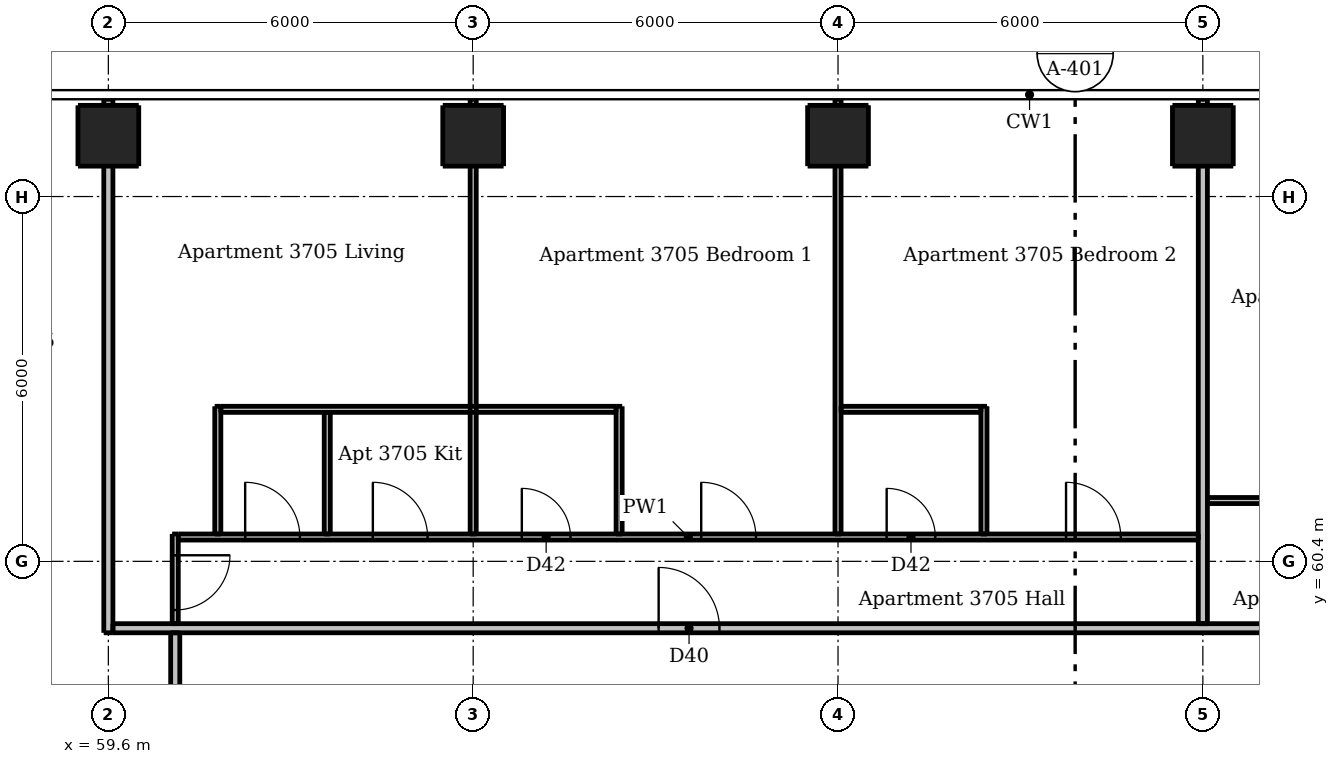
"""IFC4 building model, lengths in metres.
Left out: names, types, materials, properties, quantities, classifications, styles, units other than length and angle.
Written with IfcOpenShell. Run it as: python <this file> out.ifc"""

import sys

from ifc_helpers import new_model, si_unit, direction, frame, frame_2d, origin, origin_2d, place, context, subcontext, project, spatial, rectangle, extrude, element, fill, save


model = new_model("IFC4")
c1 = context("Model", 3, precision=1e-05, world=origin(), true_north=direction((0.0, 1.0)))
c2 = subcontext(c1, "Body", "Model", "MODEL_VIEW")
j1 = project(units=[si_unit("LENGTHUNIT", "METRE"), si_unit("PLANEANGLEUNIT", "RADIAN")], contexts=[c1])
p1 = place(None, origin())
s1 = spatial("IfcSite", under=j1, at=p1, CompositionType="ELEMENT")
p2 = place(p1, origin())
s2 = spatial("IfcBuilding", under=s1, at=p2, CompositionType="ELEMENT")
p3 = place(p2, frame((0.0, 0.0, 140.5)))
s3 = spatial("IfcBuildingStorey", under=s2, at=p3, CompositionType="ELEMENT", Elevation=140.5)
for number, where, z_axis, x_axis in (
    (1, (59.6, 67.4, 0.0), (0.0, 0.0, 1.0), (1.0, 0.0, 0.0)),
    (2, (65.6, 67.4, 0.0), (0.0, 0.0, 1.0), (1.0, 0.0, 0.0)),
    (3, (71.6, 67.4, 0.0), (0.0, 0.0, 1.0), (1.0, 0.0, 0.0)),
    (4, (77.6, 67.4, 0.0), (0.0, 0.0, 1.0), (1.0, 0.0, 0.0)),
):
    element("IfcColumn", number, at=place(p3, frame(where, z_axis=z_axis, x_axis=x_axis)), inside=s3, PredefinedType="COLUMN", context=c2, shape_type="SweptSolid", body=[
        extrude(rectangle(XDim=1.0, YDim=1.0, at=origin_2d()), origin(), (0.0, 0.0, 1.0), 3.05),
    ])
p4 = place(p3, frame((60.7, 60.85, 0.0), z_axis=(0.0, 0.0, 1.0), x_axis=(0.0, -1.0, 0.0)))
e5 = element("IfcWall", 5, at=p4, inside=s3, PredefinedType="PARTITIONING", context=c2, shape_type="SweptSolid", body=[
    extrude(rectangle(XDim=1.475, YDim=0.1, at=frame_2d((0.738, 0.0))), origin(), (0.0, 0.0, 1.0), 3.05),
])
p5 = place(p4, frame((0.35, 0.0, 0.0)))
e6 = element("IfcOpeningElement", 6, at=p5, cuts=e5, PredefinedType="OPENING", context=c2, shape_type="SweptSolid", body=[
    extrude(rectangle(XDim=0.9, YDim=2.1, at=frame_2d((0.45, 1.05))), frame((0.0, 0.06, 0.0), z_axis=(0.0, -1.0, 0.0), x_axis=(1.0, 0.0, 0.0)), (0.0, 0.0, 1.0), 0.12),
])
p6 = place(p3, frame((61.4, 60.85, 0.0), z_axis=(0.0, 0.0, 1.0), x_axis=(0.0, 1.0, 0.0)))
e7 = element("IfcWall", 7, at=p6, inside=s3, PredefinedType="PARTITIONING", context=c2, shape_type="SweptSolid", body=[
    extrude(rectangle(XDim=2.1, YDim=0.1, at=frame_2d((1.05, 0.0))), origin(), (0.0, 0.0, 1.0), 3.05),
])
p7 = place(p3, frame((63.2, 60.85, 0.0), z_axis=(0.0, 0.0, 1.0), x_axis=(0.0, 1.0, 0.0)))
e8 = element("IfcWall", 8, at=p7, inside=s3, PredefinedType="PARTITIONING", context=c2, shape_type="SweptSolid", body=[
    extrude(rectangle(XDim=2.0, YDim=0.1, at=frame_2d((1.0, 0.0))), origin(), (0.0, 0.0, 1.0), 3.05),
])
p8 = place(p3, frame((65.6, 60.85, 0.0), z_axis=(0.0, 0.0, 1.0), x_axis=(0.0, 1.0, 0.0)))
e9 = element("IfcWall", 9, at=p8, inside=s3, PredefinedType="PARTITIONING", context=c2, shape_type="SweptSolid", body=[
    extrude(rectangle(XDim=7.15, YDim=0.1, at=frame_2d((3.575, 0.0))), origin(), (0.0, 0.0, 1.0), 2.516),
])
p9 = place(p3, frame((68.0, 60.85, 0.0), z_axis=(0.0, 0.0, 1.0), x_axis=(0.0, 1.0, 0.0)))
e10 = element("IfcWall", 10, at=p9, inside=s3, PredefinedType="PARTITIONING", context=c2, shape_type="SweptSolid", body=[
    extrude(rectangle(XDim=2.1, YDim=0.1, at=frame_2d((1.05, 0.0))), origin(), (0.0, 0.0, 1.0), 3.05),
])
p10 = place(p3, frame((71.6, 60.85, 0.0), z_axis=(0.0, 0.0, 1.0), x_axis=(0.0, 1.0, 0.0)))
e11 = element("IfcWall", 11, at=p10, inside=s3, PredefinedType="PARTITIONING", context=c2, shape_type="SweptSolid", body=[
    extrude(rectangle(XDim=7.15, YDim=0.1, at=frame_2d((3.575, 0.0))), origin(), (0.0, 0.0, 1.0), 2.516),
])
p11 = place(p3, frame((74.0, 60.85, 0.0), z_axis=(0.0, 0.0, 1.0), x_axis=(0.0, 1.0, 0.0)))
e12 = element("IfcWall", 12, at=p11, inside=s3, PredefinedType="PARTITIONING", context=c2, shape_type="SweptSolid", body=[
    extrude(rectangle(XDim=2.1, YDim=0.1, at=frame_2d((1.05, 0.0))), origin(), (0.0, 0.0, 1.0), 3.05),
])
p12 = place(p3, frame((61.45, 62.9, 0.0), z_axis=(0.0, 0.0, 1.0), x_axis=(1.0, 0.0, 0.0)))
e13 = element("IfcWall", 13, at=p12, inside=s3, PredefinedType="PARTITIONING", context=c2, shape_type="SweptSolid", body=[
    extrude(rectangle(XDim=6.5, YDim=0.1, at=frame_2d((3.25, 0.0))), origin(), (0.0, 0.0, 1.0), 3.05),
])
p13 = place(p3, frame((71.65, 62.9, 0.0), z_axis=(0.0, 0.0, 1.0), x_axis=(1.0, 0.0, 0.0)))
e14 = element("IfcWall", 14, at=p13, inside=s3, PredefinedType="PARTITIONING", context=c2, shape_type="SweptSolid", body=[
    extrude(rectangle(XDim=2.3, YDim=0.1, at=frame_2d((1.15, 0.0))), origin(), (0.0, 0.0, 1.0), 3.05),
])
p14 = place(p3, frame((83.55, 61.4, 0.0), z_axis=(0.0, 0.0, 1.0), x_axis=(-1.0, 0.0, 0.0)))
e15 = element("IfcWall", 15, at=p14, inside=s3, PredefinedType="PARTITIONING", context=c2, shape_type="SweptSolid", body=[
    extrude(rectangle(XDim=5.875, YDim=0.1, at=frame_2d((2.938, 0.0))), origin(), (0.0, 0.0, 1.0), 3.05),
])
p15 = place(p14, frame((3.75, 0.0, 0.0)))
e16 = element("IfcOpeningElement", 16, at=p15, cuts=e15, PredefinedType="OPENING", context=c2, shape_type="SweptSolid", body=[
    extrude(rectangle(XDim=0.8, YDim=2.1, at=frame_2d((0.4, 1.05))), frame((0.0, 0.06, 0.0), z_axis=(0.0, -1.0, 0.0), x_axis=(1.0, 0.0, 0.0)), (0.0, 0.0, 1.0), 0.12),
])
p16 = place(p3, frame((60.75, 60.8, 0.0), z_axis=(0.0, 0.0, 1.0), x_axis=(1.0, 0.0, 0.0)))
e17 = element("IfcWall", 17, at=p16, inside=s3, PredefinedType="PARTITIONING", context=c2, shape_type="SweptSolid", body=[
    extrude(rectangle(XDim=16.775, YDim=0.1, at=frame_2d((8.387, 0.0))), origin(), (0.0, 0.0, 1.0), 3.05),
])
p17 = place(p16, frame((3.2, 0.0, 0.0)))
e18 = element("IfcOpeningElement", 18, at=p17, cuts=e17, PredefinedType="OPENING", context=c2, shape_type="SweptSolid", body=[
    extrude(rectangle(XDim=0.9, YDim=2.1, at=frame_2d((0.45, 1.05))), frame((0.0, 0.06, 0.0), z_axis=(0.0, -1.0, 0.0), x_axis=(1.0, 0.0, 0.0)), (0.0, 0.0, 1.0), 0.12),
])
p18 = place(p16, frame((1.1, 0.0, 0.0)))
e19 = element("IfcOpeningElement", 19, at=p18, cuts=e17, PredefinedType="OPENING", context=c2, shape_type="SweptSolid", body=[
    extrude(rectangle(XDim=0.9, YDim=2.1, at=frame_2d((0.45, 1.05))), frame((0.0, 0.06, 0.0), z_axis=(0.0, -1.0, 0.0), x_axis=(1.0, 0.0, 0.0)), (0.0, 0.0, 1.0), 0.12),
])
p19 = place(p16, frame((8.6, 0.0, 0.0)))
e20 = element("IfcOpeningElement", 20, at=p19, cuts=e17, PredefinedType="OPENING", context=c2, shape_type="SweptSolid", body=[
    extrude(rectangle(XDim=0.9, YDim=2.1, at=frame_2d((0.45, 1.05))), frame((0.0, 0.06, 0.0), z_axis=(0.0, -1.0, 0.0), x_axis=(1.0, 0.0, 0.0)), (0.0, 0.0, 1.0), 0.12),
])
p20 = place(p16, frame((14.6, 0.0, 0.0)))
e21 = element("IfcOpeningElement", 21, at=p20, cuts=e17, PredefinedType="OPENING", context=c2, shape_type="SweptSolid", body=[
    extrude(rectangle(XDim=0.9, YDim=2.1, at=frame_2d((0.45, 1.05))), frame((0.0, 0.06, 0.0), z_axis=(0.0, -1.0, 0.0), x_axis=(1.0, 0.0, 0.0)), (0.0, 0.0, 1.0), 0.12),
])
p21 = place(p16, frame((5.65, 0.0, 0.0)))
e22 = element("IfcOpeningElement", 22, at=p21, cuts=e17, PredefinedType="OPENING", context=c2, shape_type="SweptSolid", body=[
    extrude(rectangle(XDim=0.8, YDim=2.1, at=frame_2d((0.4, 1.05))), frame((0.0, 0.06, 0.0), z_axis=(0.0, -1.0, 0.0), x_axis=(1.0, 0.0, 0.0)), (0.0, 0.0, 1.0), 0.12),
])
p22 = place(p16, frame((11.65, 0.0, 0.0)))
e23 = element("IfcOpeningElement", 23, at=p22, cuts=e17, PredefinedType="OPENING", context=c2, shape_type="SweptSolid", body=[
    extrude(rectangle(XDim=0.8, YDim=2.1, at=frame_2d((0.4, 1.05))), frame((0.0, 0.06, 0.0), z_axis=(0.0, -1.0, 0.0), x_axis=(1.0, 0.0, 0.0)), (0.0, 0.0, 1.0), 0.12),
])
p23 = place(p3, frame((59.6, 59.225, 0.0), z_axis=(0.0, 0.0, 1.0), x_axis=(0.0, 1.0, 0.0)))
e24 = element("IfcWall", 24, at=p23, inside=s3, PredefinedType="PARTITIONING", context=c2, shape_type="SweptSolid", body=[
    extrude(rectangle(XDim=8.775, YDim=0.15, at=frame_2d((4.387, 0.0))), origin(), (0.0, 0.0, 1.0), 2.51),
])
p24 = place(p3, frame((60.7, 30.325, 0.0), z_axis=(0.0, 0.0, 1.0), x_axis=(0.0, 1.0, 0.0)))
e25 = element("IfcWall", 25, at=p24, inside=s3, PredefinedType="PARTITIONING", context=c2, shape_type="SweptSolid", body=[
    extrude(rectangle(XDim=28.9, YDim=0.15, at=frame_2d((14.45, 0.0))), origin(), (0.0, 0.0, 1.0), 3.05),
])
p25 = place(p24, frame((9.225, 0.0, 0.0)))
e26 = element("IfcOpeningElement", 26, at=p25, cuts=e25, PredefinedType="OPENING", context=c2, shape_type="SweptSolid", body=[
    extrude(rectangle(XDim=1.0, YDim=2.1, at=frame_2d((0.5, 1.05))), frame((0.0, 0.085, 0.0), z_axis=(0.0, -1.0, 0.0), x_axis=(1.0, 0.0, 0.0)), (0.0, 0.0, 1.0), 0.17),
])
p26 = place(p24, frame((26.025, 0.0, 0.0)))
e27 = element("IfcOpeningElement", 27, at=p26, cuts=e25, PredefinedType="OPENING", context=c2, shape_type="SweptSolid", body=[
    extrude(rectangle(XDim=1.0, YDim=2.1, at=frame_2d((0.5, 1.05))), frame((0.0, 0.085, 0.0), z_axis=(0.0, -1.0, 0.0), x_axis=(1.0, 0.0, 0.0)), (0.0, 0.0, 1.0), 0.17),
])
p27 = place(p3, frame((77.6, 59.375, 0.0), z_axis=(0.0, 0.0, 1.0), x_axis=(0.0, 1.0, 0.0)))
e28 = element("IfcWall", 28, at=p27, inside=s3, PredefinedType="PARTITIONING", context=c2, shape_type="SweptSolid", body=[
    extrude(rectangle(XDim=8.625, YDim=0.15, at=frame_2d((4.312, 0.0))), origin(), (0.0, 0.0, 1.0), 2.516),
])
p28 = place(p3, frame((59.675, 59.3, 0.0), z_axis=(0.0, 0.0, 1.0), x_axis=(1.0, 0.0, 0.0)))
e29 = element("IfcWall", 29, at=p28, inside=s3, PredefinedType="PARTITIONING", context=c2, shape_type="SweptSolid", body=[
    extrude(rectangle(XDim=28.55, YDim=0.15, at=frame_2d((14.275, 0.0))), origin(), (0.0, 0.0, 1.0), 3.05),
])
p29 = place(p28, frame((8.975, 0.0, 0.0)))
e30 = element("IfcOpeningElement", 30, at=p29, cuts=e29, PredefinedType="OPENING", context=c2, shape_type="SweptSolid", body=[
    extrude(rectangle(XDim=1.0, YDim=2.1, at=frame_2d((0.5, 1.05))), frame((0.0, 0.085, 0.0), z_axis=(0.0, -1.0, 0.0), x_axis=(1.0, 0.0, 0.0)), (0.0, 0.0, 1.0), 0.17),
])
p30 = place(p28, frame((25.775, 0.0, 0.0)))
e31 = element("IfcOpeningElement", 31, at=p30, cuts=e29, PredefinedType="OPENING", context=c2, shape_type="SweptSolid", body=[
    extrude(rectangle(XDim=1.0, YDim=2.1, at=frame_2d((0.5, 1.05))), frame((0.0, 0.085, 0.0), z_axis=(0.0, -1.0, 0.0), x_axis=(1.0, 0.0, 0.0)), (0.0, 0.0, 1.0), 0.17),
])
p31 = place(p29, origin())
e32 = element("IfcDoor", 32, at=p31, inside=s3, OperationType="SINGLE_SWING_LEFT", PredefinedType="DOOR", context=c2, shape_type="SweptSolid", body=[
    extrude(rectangle(XDim=1.0, YDim=2.1, at=frame_2d((0.5, 1.05))), frame((0.0, 0.025, 0.0), z_axis=(0.0, -1.0, 0.0), x_axis=(1.0, 0.0, 0.0)), (0.0, 0.0, 1.0), 0.05),
])
fill(e30, e32)
p32 = place(p5, origin())
e33 = element("IfcDoor", 33, at=p32, inside=s3, OperationType="SINGLE_SWING_LEFT", PredefinedType="DOOR", context=c2, shape_type="SweptSolid", body=[
    extrude(rectangle(XDim=0.9, YDim=2.1, at=frame_2d((0.45, 1.05))), frame((0.0, 0.025, 0.0), z_axis=(0.0, -1.0, 0.0), x_axis=(1.0, 0.0, 0.0)), (0.0, 0.0, 1.0), 0.05),
])
fill(e6, e33)
p33 = place(p17, origin())
e34 = element("IfcDoor", 34, at=p33, inside=s3, OperationType="SINGLE_SWING_LEFT", PredefinedType="DOOR", context=c2, shape_type="SweptSolid", body=[
    extrude(rectangle(XDim=0.9, YDim=2.1, at=frame_2d((0.45, 1.05))), frame((0.0, 0.025, 0.0), z_axis=(0.0, -1.0, 0.0), x_axis=(1.0, 0.0, 0.0)), (0.0, 0.0, 1.0), 0.05),
])
fill(e18, e34)
p34 = place(p18, origin())
e35 = element("IfcDoor", 35, at=p34, inside=s3, OperationType="SINGLE_SWING_LEFT", PredefinedType="DOOR", context=c2, shape_type="SweptSolid", body=[
    extrude(rectangle(XDim=0.9, YDim=2.1, at=frame_2d((0.45, 1.05))), frame((0.0, 0.025, 0.0), z_axis=(0.0, -1.0, 0.0), x_axis=(1.0, 0.0, 0.0)), (0.0, 0.0, 1.0), 0.05),
])
fill(e19, e35)
p35 = place(p19, origin())
e36 = element("IfcDoor", 36, at=p35, inside=s3, OperationType="SINGLE_SWING_LEFT", PredefinedType="DOOR", context=c2, shape_type="SweptSolid", body=[
    extrude(rectangle(XDim=0.9, YDim=2.1, at=frame_2d((0.45, 1.05))), frame((0.0, 0.025, 0.0), z_axis=(0.0, -1.0, 0.0), x_axis=(1.0, 0.0, 0.0)), (0.0, 0.0, 1.0), 0.05),
])
fill(e20, e36)
p36 = place(p20, origin())
e37 = element("IfcDoor", 37, at=p36, inside=s3, OperationType="SINGLE_SWING_LEFT", PredefinedType="DOOR", context=c2, shape_type="SweptSolid", body=[
    extrude(rectangle(XDim=0.9, YDim=2.1, at=frame_2d((0.45, 1.05))), frame((0.0, 0.025, 0.0), z_axis=(0.0, -1.0, 0.0), x_axis=(1.0, 0.0, 0.0)), (0.0, 0.0, 1.0), 0.05),
])
fill(e21, e37)
p37 = place(p21, origin())
e38 = element("IfcDoor", 38, at=p37, inside=s3, OperationType="SINGLE_SWING_LEFT", PredefinedType="DOOR", context=c2, shape_type="SweptSolid", body=[
    extrude(rectangle(XDim=0.8, YDim=2.1, at=frame_2d((0.4, 1.05))), frame((0.0, 0.025, 0.0), z_axis=(0.0, -1.0, 0.0), x_axis=(1.0, 0.0, 0.0)), (0.0, 0.0, 1.0), 0.05),
])
fill(e22, e38)
p38 = place(p22, origin())
e39 = element("IfcDoor", 39, at=p38, inside=s3, OperationType="SINGLE_SWING_LEFT", PredefinedType="DOOR", context=c2, shape_type="SweptSolid", body=[
    extrude(rectangle(XDim=0.8, YDim=2.1, at=frame_2d((0.4, 1.05))), frame((0.0, 0.025, 0.0), z_axis=(0.0, -1.0, 0.0), x_axis=(1.0, 0.0, 0.0)), (0.0, 0.0, 1.0), 0.05),
])
fill(e23, e39)
save(model, sys.argv[1])
